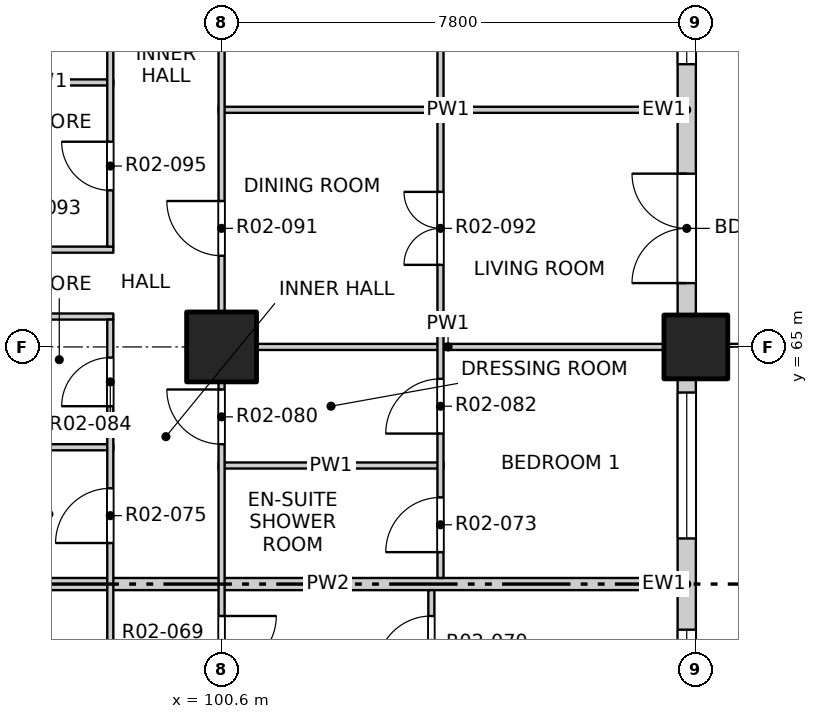
"""IFC4 building model, lengths in metres.
Left out: names, types, materials, properties, quantities, classifications, styles, units other than length and angle.
Written with IfcOpenShell. Run it as: python <this file> out.ifc"""

import sys

from ifc_helpers import new_model, si_unit, direction, frame, frame_2d, origin, origin_2d, place, context, subcontext, project, spatial, rectangle, extrude, element, fill, save


model = new_model("IFC4")
c1 = context("Model", 3, precision=1e-05, world=origin(), true_north=direction((0.0, 1.0)))
c2 = subcontext(c1, "Body", "Model", "MODEL_VIEW")
j1 = project(units=[si_unit("LENGTHUNIT", "METRE"), si_unit("PLANEANGLEUNIT", "RADIAN")], contexts=[c1])
p1 = place(None, origin())
s1 = spatial("IfcSite", under=j1, at=p1, CompositionType="ELEMENT")
p2 = place(p1, origin())
s2 = spatial("IfcBuilding", under=s1, at=p2, CompositionType="ELEMENT")
p3 = place(p2, frame((0.0, 0.0, 36.5)))
s3 = spatial("IfcBuildingStorey", under=s2, at=p3, CompositionType="ELEMENT", Elevation=36.5)
p4 = place(p3, frame((108.4, 65.0, -0.25), z_axis=(0.0, 0.0, 1.0), x_axis=(1.0, 0.0, 0.0)))
e1 = element("IfcColumn", 1, at=p4, inside=s3, PredefinedType="COLUMN", context=c2, shape_type="SweptSolid", body=[
    extrude(rectangle(XDim=1.05, YDim=1.05, at=origin_2d()), origin(), (0.0, 0.0, 1.0), 3.4),
])
p5 = place(p3, frame((100.6, 65.0, -0.25), z_axis=(0.0, 0.0, 1.0), x_axis=(1.0, 0.0, 0.0)))
e2 = element("IfcColumn", 2, at=p5, inside=s3, PredefinedType="COLUMN", context=c2, shape_type="SweptSolid", body=[
    extrude(rectangle(XDim=1.15, YDim=1.15, at=origin_2d()), origin(), (0.0, 0.0, 1.0), 3.4),
])
p6 = place(p3, frame((108.25, 57.725, 0.0), z_axis=(0.0, 0.0, 1.0), x_axis=(0.0, 1.0, 0.0)))
e3 = element("IfcWall", 3, at=p6, inside=s3, PredefinedType="SOLIDWALL", context=c2, shape_type="SweptSolid", body=[
    extrude(rectangle(XDim=6.75, YDim=0.3, at=frame_2d((3.375, 0.0))), origin(), (0.0, 0.0, 1.0), 2.7),
])
p7 = place(p6, frame((0.225, 0.0, 0.9)))
e4 = element("IfcOpeningElement", 4, at=p7, cuts=e3, PredefinedType="OPENING", context=c2, shape_type="SweptSolid", body=[
    extrude(rectangle(XDim=2.4, YDim=1.8, at=frame_2d((1.2, 0.9))), frame((0.0, 0.16, 0.0), z_axis=(0.0, -1.0, 0.0), x_axis=(1.0, 0.0, 0.0)), (0.0, 0.0, 1.0), 0.32),
])
p8 = place(p6, frame((4.125, 0.0, 0.9)))
e5 = element("IfcOpeningElement", 5, at=p8, cuts=e3, PredefinedType="OPENING", context=c2, shape_type="SweptSolid", body=[
    extrude(rectangle(XDim=2.4, YDim=1.8, at=frame_2d((1.2, 0.9))), frame((0.0, 0.16, 0.0), z_axis=(0.0, -1.0, 0.0), x_axis=(1.0, 0.0, 0.0)), (0.0, 0.0, 1.0), 0.32),
])
p9 = place(p3, frame((108.25, 65.525, 0.0), z_axis=(0.0, 0.0, 1.0), x_axis=(0.0, 1.0, 0.0)))
e6 = element("IfcWall", 6, at=p9, inside=s3, PredefinedType="SOLIDWALL", context=c2, shape_type="SweptSolid", body=[
    extrude(rectangle(XDim=6.75, YDim=0.3, at=frame_2d((3.375, 0.0))), origin(), (0.0, 0.0, 1.0), 2.7),
])
p10 = place(p9, frame((0.525, 0.0, 0.0)))
e7 = element("IfcOpeningElement", 7, at=p10, cuts=e6, PredefinedType="OPENING", context=c2, shape_type="SweptSolid", body=[
    extrude(rectangle(XDim=1.8, YDim=2.4, at=frame_2d((0.9, 1.2))), frame((0.0, 0.16, 0.0), z_axis=(0.0, -1.0, 0.0), x_axis=(1.0, 0.0, 0.0)), (0.0, 0.0, 1.0), 0.32),
])
p11 = place(p9, frame((4.125, 0.0, 0.9)))
e8 = element("IfcOpeningElement", 8, at=p11, cuts=e6, PredefinedType="OPENING", context=c2, shape_type="SweptSolid", body=[
    extrude(rectangle(XDim=2.4, YDim=1.8, at=frame_2d((1.2, 0.9))), frame((0.0, 0.16, 0.0), z_axis=(0.0, -1.0, 0.0), x_axis=(1.0, 0.0, 0.0)), (0.0, 0.0, 1.0), 0.32),
])
p12 = place(p3, frame((96.6, 61.1, 0.0), z_axis=(0.0, 0.0, 1.0), x_axis=(1.0, 0.0, 0.0)))
e9 = element("IfcWall", 9, at=p12, inside=s3, PredefinedType="PARTITIONING", context=c2, shape_type="SweptSolid", body=[
    extrude(rectangle(XDim=11.5, YDim=0.2, at=frame_2d((5.75, 0.0))), origin(), (0.0, 0.0, 1.0), 3.15),
])
p13 = place(p3, frame((100.55, 63.05, 0.0), z_axis=(0.0, 0.0, 1.0), x_axis=(1.0, 0.0, 0.0)))
e10 = element("IfcWall", 10, at=p13, inside=s3, PredefinedType="PARTITIONING", context=c2, shape_type="SweptSolid", body=[
    extrude(rectangle(XDim=3.7, YDim=0.1, at=frame_2d((1.85, 0.0))), origin(), (0.0, 0.0, 1.0), 3.15),
])
p14 = place(p3, frame((96.6, 63.35, 0.0), z_axis=(0.0, 0.0, 1.0), x_axis=(1.0, 0.0, 0.0)))
e11 = element("IfcWall", 11, at=p14, inside=s3, PredefinedType="PARTITIONING", context=c2, shape_type="SweptSolid", body=[
    extrude(rectangle(XDim=2.22, YDim=0.1, at=frame_2d((1.11, 0.0))), origin(), (0.0, 0.0, 1.0), 3.15),
])
p15 = place(p3, frame((100.55, 65.0, 0.0), z_axis=(0.0, 0.0, 1.0), x_axis=(1.0, 0.0, 0.0)))
e12 = element("IfcWall", 12, at=p15, inside=s3, PredefinedType="PARTITIONING", context=c2, shape_type="SweptSolid", body=[
    extrude(rectangle(XDim=7.55, YDim=0.1, at=frame_2d((3.775, 0.0))), origin(), (0.0, 0.0, 1.0), 2.55),
])
for number, where, z_axis, x_axis in (
    (13, (96.6, 65.5, 0.0), (0.0, 0.0, 1.0), (1.0, 0.0, 0.0)),
    (14, (96.6, 66.6, 0.0), (0.0, 0.0, 1.0), (1.0, 0.0, 0.0)),
):
    element("IfcWall", number, at=place(p3, frame(where, z_axis=z_axis, x_axis=x_axis)), inside=s3, PredefinedType="PARTITIONING", context=c2, shape_type="SweptSolid", body=[
        extrude(rectangle(XDim=2.22, YDim=0.1, at=frame_2d((1.11, 0.0))), origin(), (0.0, 0.0, 1.0), 3.15),
    ])
p16 = place(p3, frame((100.55, 68.9, 0.0), z_axis=(0.0, 0.0, 1.0), x_axis=(1.0, 0.0, 0.0)))
e15 = element("IfcWall", 15, at=p16, inside=s3, PredefinedType="PARTITIONING", context=c2, shape_type="SweptSolid", body=[
    extrude(rectangle(XDim=7.55, YDim=0.1, at=frame_2d((3.775, 0.0))), origin(), (0.0, 0.0, 1.0), 3.15),
])
p17 = place(p3, frame((96.6, 69.35, 0.0), z_axis=(0.0, 0.0, 1.0), x_axis=(1.0, 0.0, 0.0)))
e16 = element("IfcWall", 16, at=p17, inside=s3, PredefinedType="PARTITIONING", context=c2, shape_type="SweptSolid", body=[
    extrude(rectangle(XDim=2.22, YDim=0.1, at=frame_2d((1.11, 0.0))), origin(), (0.0, 0.0, 1.0), 3.15),
])
p18 = place(p3, frame((98.77, 55.7, 0.0), z_axis=(0.0, 0.0, 1.0), x_axis=(0.0, 1.0, 0.0)))
e17 = element("IfcWall", 17, at=p18, inside=s3, PredefinedType="PARTITIONING", context=c2, shape_type="SweptSolid", body=[
    extrude(rectangle(XDim=9.75, YDim=0.1, at=frame_2d((4.875, 0.0))), origin(), (0.0, 0.0, 1.0), 3.15),
])
p19 = place(p18, frame((0.7, 0.0, 0.0)))
e18 = element("IfcOpeningElement", 18, at=p19, cuts=e17, PredefinedType="OPENING", context=c2, shape_type="SweptSolid", body=[
    extrude(rectangle(XDim=0.8, YDim=2.1, at=frame_2d((0.4, 1.05))), frame((0.0, 0.06, 0.0), z_axis=(0.0, -1.0, 0.0), x_axis=(1.0, 0.0, 0.0)), (0.0, 0.0, 1.0), 0.12),
])
p20 = place(p18, frame((3.375, 0.0, 0.0)))
e19 = element("IfcOpeningElement", 19, at=p20, cuts=e17, PredefinedType="OPENING", context=c2, shape_type="SweptSolid", body=[
    extrude(rectangle(XDim=0.9, YDim=2.1, at=frame_2d((0.45, 1.05))), frame((0.0, 0.06, 0.0), z_axis=(0.0, -1.0, 0.0), x_axis=(1.0, 0.0, 0.0)), (0.0, 0.0, 1.0), 0.12),
])
p21 = place(p18, frame((6.075, 0.0, 0.0)))
e20 = element("IfcOpeningElement", 20, at=p21, cuts=e17, PredefinedType="OPENING", context=c2, shape_type="SweptSolid", body=[
    extrude(rectangle(XDim=0.9, YDim=2.1, at=frame_2d((0.45, 1.05))), frame((0.0, 0.06, 0.0), z_axis=(0.0, -1.0, 0.0), x_axis=(1.0, 0.0, 0.0)), (0.0, 0.0, 1.0), 0.12),
])
p22 = place(p18, frame((8.325, 0.0, 0.0)))
e21 = element("IfcOpeningElement", 21, at=p22, cuts=e17, PredefinedType="OPENING", context=c2, shape_type="SweptSolid", body=[
    extrude(rectangle(XDim=0.8, YDim=2.1, at=frame_2d((0.4, 1.05))), frame((0.0, 0.06, 0.0), z_axis=(0.0, -1.0, 0.0), x_axis=(1.0, 0.0, 0.0)), (0.0, 0.0, 1.0), 0.12),
])
p23 = place(p3, frame((98.77, 66.65, 0.0), z_axis=(0.0, 0.0, 1.0), x_axis=(0.0, 1.0, 0.0)))
e22 = element("IfcWall", 22, at=p23, inside=s3, PredefinedType="PARTITIONING", context=c2, shape_type="SweptSolid", body=[
    extrude(rectangle(XDim=14.95, YDim=0.1, at=frame_2d((7.475, 0.0))), origin(), (0.0, 0.0, 1.0), 3.15),
])
p24 = place(p23, frame((0.925, 0.0, 0.0)))
e23 = element("IfcOpeningElement", 23, at=p24, cuts=e22, PredefinedType="OPENING", context=c2, shape_type="SweptSolid", body=[
    extrude(rectangle(XDim=0.8, YDim=2.1, at=frame_2d((0.4, 1.05))), frame((0.0, 0.06, 0.0), z_axis=(0.0, -1.0, 0.0), x_axis=(1.0, 0.0, 0.0)), (0.0, 0.0, 1.0), 0.12),
])
p25 = place(p23, frame((3.975, 0.0, 0.0)))
e24 = element("IfcOpeningElement", 24, at=p25, cuts=e22, PredefinedType="OPENING", context=c2, shape_type="SweptSolid", body=[
    extrude(rectangle(XDim=0.9, YDim=2.1, at=frame_2d((0.45, 1.05))), frame((0.0, 0.06, 0.0), z_axis=(0.0, -1.0, 0.0), x_axis=(1.0, 0.0, 0.0)), (0.0, 0.0, 1.0), 0.12),
])
p26 = place(p23, frame((6.915, 0.0, 0.0)))
e25 = element("IfcOpeningElement", 25, at=p26, cuts=e22, PredefinedType="OPENING", context=c2, shape_type="SweptSolid", body=[
    extrude(rectangle(XDim=0.9, YDim=2.1, at=frame_2d((0.45, 1.05))), frame((0.0, 0.06, 0.0), z_axis=(0.0, -1.0, 0.0), x_axis=(1.0, 0.0, 0.0)), (0.0, 0.0, 1.0), 0.12),
])
p27 = place(p23, frame((9.63, 0.0, 0.0)))
e26 = element("IfcOpeningElement", 26, at=p27, cuts=e22, PredefinedType="OPENING", context=c2, shape_type="SweptSolid", body=[
    extrude(rectangle(XDim=0.8, YDim=2.1, at=frame_2d((0.4, 1.05))), frame((0.0, 0.06, 0.0), z_axis=(0.0, -1.0, 0.0), x_axis=(1.0, 0.0, 0.0)), (0.0, 0.0, 1.0), 0.12),
])
p28 = place(p23, frame((12.79, 0.0, 0.0)))
e27 = element("IfcOpeningElement", 27, at=p28, cuts=e22, PredefinedType="OPENING", context=c2, shape_type="SweptSolid", body=[
    extrude(rectangle(XDim=0.9, YDim=2.1, at=frame_2d((0.45, 1.05))), frame((0.0, 0.06, 0.0), z_axis=(0.0, -1.0, 0.0), x_axis=(1.0, 0.0, 0.0)), (0.0, 0.0, 1.0), 0.12),
])
p29 = place(p3, frame((100.6, 49.4, 0.0), z_axis=(0.0, 0.0, 1.0), x_axis=(0.0, 1.0, 0.0)))
e28 = element("IfcWall", 28, at=p29, inside=s3, PredefinedType="PARTITIONING", context=c2, shape_type="SweptSolid", body=[
    extrude(rectangle(XDim=31.2, YDim=0.1, at=frame_2d((15.6, 0.0))), origin(), (0.0, 0.0, 1.0), 3.15),
])
p30 = place(p29, frame((2.475, 0.0, 0.0)))
e29 = element("IfcOpeningElement", 29, at=p30, cuts=e28, PredefinedType="OPENING", context=c2, shape_type="SweptSolid", body=[
    extrude(rectangle(XDim=0.9, YDim=2.1, at=frame_2d((0.45, 1.05))), frame((0.0, 0.06, 0.0), z_axis=(0.0, -1.0, 0.0), x_axis=(1.0, 0.0, 0.0)), (0.0, 0.0, 1.0), 0.12),
])
p31 = place(p29, frame((5.4, 0.0, 0.0)))
e30 = element("IfcOpeningElement", 30, at=p31, cuts=e28, PredefinedType="OPENING", context=c2, shape_type="SweptSolid", body=[
    extrude(rectangle(XDim=0.9, YDim=2.1, at=frame_2d((0.45, 1.05))), frame((0.0, 0.06, 0.0), z_axis=(0.0, -1.0, 0.0), x_axis=(1.0, 0.0, 0.0)), (0.0, 0.0, 1.0), 0.12),
])
p32 = place(p29, frame((10.275, 0.0, 0.0)))
e31 = element("IfcOpeningElement", 31, at=p32, cuts=e28, PredefinedType="OPENING", context=c2, shape_type="SweptSolid", body=[
    extrude(rectangle(XDim=0.9, YDim=2.1, at=frame_2d((0.45, 1.05))), frame((0.0, 0.06, 0.0), z_axis=(0.0, -1.0, 0.0), x_axis=(1.0, 0.0, 0.0)), (0.0, 0.0, 1.0), 0.12),
])
p33 = place(p29, frame((14.0, 0.0, 0.0)))
e32 = element("IfcOpeningElement", 32, at=p33, cuts=e28, PredefinedType="OPENING", context=c2, shape_type="SweptSolid", body=[
    extrude(rectangle(XDim=0.9, YDim=2.1, at=frame_2d((0.45, 1.05))), frame((0.0, 0.06, 0.0), z_axis=(0.0, -1.0, 0.0), x_axis=(1.0, 0.0, 0.0)), (0.0, 0.0, 1.0), 0.12),
])
p34 = place(p29, frame((17.1, 0.0, 0.0)))
e33 = element("IfcOpeningElement", 33, at=p34, cuts=e28, PredefinedType="OPENING", context=c2, shape_type="SweptSolid", body=[
    extrude(rectangle(XDim=0.9, YDim=2.1, at=frame_2d((0.45, 1.05))), frame((0.0, 0.06, 0.0), z_axis=(0.0, -1.0, 0.0), x_axis=(1.0, 0.0, 0.0)), (0.0, 0.0, 1.0), 0.12),
])
p35 = place(p29, frame((21.0, 0.0, 0.0)))
e34 = element("IfcOpeningElement", 34, at=p35, cuts=e28, PredefinedType="OPENING", context=c2, shape_type="SweptSolid", body=[
    extrude(rectangle(XDim=0.9, YDim=2.1, at=frame_2d((0.45, 1.05))), frame((0.0, 0.06, 0.0), z_axis=(0.0, -1.0, 0.0), x_axis=(1.0, 0.0, 0.0)), (0.0, 0.0, 1.0), 0.12),
])
p36 = place(p29, frame((25.875, 0.0, 0.0)))
e35 = element("IfcOpeningElement", 35, at=p36, cuts=e28, PredefinedType="OPENING", context=c2, shape_type="SweptSolid", body=[
    extrude(rectangle(XDim=0.9, YDim=2.1, at=frame_2d((0.45, 1.05))), frame((0.0, 0.06, 0.0), z_axis=(0.0, -1.0, 0.0), x_axis=(1.0, 0.0, 0.0)), (0.0, 0.0, 1.0), 0.12),
])
p37 = place(p29, frame((29.6, 0.0, 0.0)))
e36 = element("IfcOpeningElement", 36, at=p37, cuts=e28, PredefinedType="OPENING", context=c2, shape_type="SweptSolid", body=[
    extrude(rectangle(XDim=0.9, YDim=2.1, at=frame_2d((0.45, 1.05))), frame((0.0, 0.06, 0.0), z_axis=(0.0, -1.0, 0.0), x_axis=(1.0, 0.0, 0.0)), (0.0, 0.0, 1.0), 0.12),
])
p38 = place(p3, frame((104.05, 41.9, 0.0), z_axis=(0.0, 0.0, 1.0), x_axis=(0.0, 1.0, 0.0)))
e37 = element("IfcWall", 37, at=p38, inside=s3, PredefinedType="PARTITIONING", context=c2, shape_type="SweptSolid", body=[
    extrude(rectangle(XDim=19.1, YDim=0.1, at=frame_2d((9.55, 0.0))), origin(), (0.0, 0.0, 1.0), 3.15),
])
p39 = place(p38, frame((1.05, 0.0, 0.0)))
e38 = element("IfcOpeningElement", 38, at=p39, cuts=e37, PredefinedType="OPENING", context=c2, shape_type="SweptSolid", body=[
    extrude(rectangle(XDim=1.2, YDim=2.1, at=frame_2d((0.6, 1.05))), frame((0.0, 0.06, 0.0), z_axis=(0.0, -1.0, 0.0), x_axis=(1.0, 0.0, 0.0)), (0.0, 0.0, 1.0), 0.12),
])
p40 = place(p38, frame((4.95, 0.0, 0.0)))
e39 = element("IfcOpeningElement", 39, at=p40, cuts=e37, PredefinedType="OPENING", context=c2, shape_type="SweptSolid", body=[
    extrude(rectangle(XDim=1.2, YDim=2.1, at=frame_2d((0.6, 1.05))), frame((0.0, 0.06, 0.0), z_axis=(0.0, -1.0, 0.0), x_axis=(1.0, 0.0, 0.0)), (0.0, 0.0, 1.0), 0.12),
])
p41 = place(p38, frame((8.025, 0.0, 0.0)))
e40 = element("IfcOpeningElement", 40, at=p41, cuts=e37, PredefinedType="OPENING", context=c2, shape_type="SweptSolid", body=[
    extrude(rectangle(XDim=0.9, YDim=2.1, at=frame_2d((0.45, 1.05))), frame((0.0, 0.06, 0.0), z_axis=(0.0, -1.0, 0.0), x_axis=(1.0, 0.0, 0.0)), (0.0, 0.0, 1.0), 0.12),
])
p42 = place(p38, frame((9.975, 0.0, 0.0)))
e41 = element("IfcOpeningElement", 41, at=p42, cuts=e37, PredefinedType="OPENING", context=c2, shape_type="SweptSolid", body=[
    extrude(rectangle(XDim=0.9, YDim=2.1, at=frame_2d((0.45, 1.05))), frame((0.0, 0.06, 0.0), z_axis=(0.0, -1.0, 0.0), x_axis=(1.0, 0.0, 0.0)), (0.0, 0.0, 1.0), 0.12),
])
p43 = place(p38, frame((12.75, 0.0, 0.0)))
e42 = element("IfcOpeningElement", 42, at=p43, cuts=e37, PredefinedType="OPENING", context=c2, shape_type="SweptSolid", body=[
    extrude(rectangle(XDim=1.2, YDim=2.1, at=frame_2d((0.6, 1.05))), frame((0.0, 0.06, 0.0), z_axis=(0.0, -1.0, 0.0), x_axis=(1.0, 0.0, 0.0)), (0.0, 0.0, 1.0), 0.12),
])
p44 = place(p38, frame((15.825, 0.0, 0.0)))
e43 = element("IfcOpeningElement", 43, at=p44, cuts=e37, PredefinedType="OPENING", context=c2, shape_type="SweptSolid", body=[
    extrude(rectangle(XDim=0.9, YDim=2.1, at=frame_2d((0.45, 1.05))), frame((0.0, 0.06, 0.0), z_axis=(0.0, -1.0, 0.0), x_axis=(1.0, 0.0, 0.0)), (0.0, 0.0, 1.0), 0.12),
])
p45 = place(p38, frame((17.775, 0.0, 0.0)))
e44 = element("IfcOpeningElement", 44, at=p45, cuts=e37, PredefinedType="OPENING", context=c2, shape_type="SweptSolid", body=[
    extrude(rectangle(XDim=0.9, YDim=2.1, at=frame_2d((0.45, 1.05))), frame((0.0, 0.06, 0.0), z_axis=(0.0, -1.0, 0.0), x_axis=(1.0, 0.0, 0.0)), (0.0, 0.0, 1.0), 0.12),
])
p46 = place(p3, frame((104.2, 61.2, 0.0), z_axis=(0.0, 0.0, 1.0), x_axis=(0.0, 1.0, 0.0)))
e45 = element("IfcWall", 45, at=p46, inside=s3, PredefinedType="PARTITIONING", context=c2, shape_type="SweptSolid", body=[
    extrude(rectangle(XDim=11.5, YDim=0.1, at=frame_2d((5.75, 0.0))), origin(), (0.0, 0.0, 1.0), 3.15),
])
p47 = place(p46, frame((0.425, 0.0, 0.0)))
e46 = element("IfcOpeningElement", 46, at=p47, cuts=e45, PredefinedType="OPENING", context=c2, shape_type="SweptSolid", body=[
    extrude(rectangle(XDim=0.9, YDim=2.1, at=frame_2d((0.45, 1.05))), frame((0.0, 0.06, 0.0), z_axis=(0.0, -1.0, 0.0), x_axis=(1.0, 0.0, 0.0)), (0.0, 0.0, 1.0), 0.12),
])
p48 = place(p46, frame((2.375, 0.0, 0.0)))
e47 = element("IfcOpeningElement", 47, at=p48, cuts=e45, PredefinedType="OPENING", context=c2, shape_type="SweptSolid", body=[
    extrude(rectangle(XDim=0.9, YDim=2.1, at=frame_2d((0.45, 1.05))), frame((0.0, 0.06, 0.0), z_axis=(0.0, -1.0, 0.0), x_axis=(1.0, 0.0, 0.0)), (0.0, 0.0, 1.0), 0.12),
])
p49 = place(p46, frame((5.15, 0.0, 0.0)))
e48 = element("IfcOpeningElement", 48, at=p49, cuts=e45, PredefinedType="OPENING", context=c2, shape_type="SweptSolid", body=[
    extrude(rectangle(XDim=1.2, YDim=2.1, at=frame_2d((0.6, 1.05))), frame((0.0, 0.06, 0.0), z_axis=(0.0, -1.0, 0.0), x_axis=(1.0, 0.0, 0.0)), (0.0, 0.0, 1.0), 0.12),
])
p50 = place(p46, frame((9.05, 0.0, 0.0)))
e49 = element("IfcOpeningElement", 49, at=p50, cuts=e45, PredefinedType="OPENING", context=c2, shape_type="SweptSolid", body=[
    extrude(rectangle(XDim=1.2, YDim=2.1, at=frame_2d((0.6, 1.05))), frame((0.0, 0.06, 0.0), z_axis=(0.0, -1.0, 0.0), x_axis=(1.0, 0.0, 0.0)), (0.0, 0.0, 1.0), 0.12),
])
p51 = place(p7, origin())
e50 = element("IfcWindow", 50, at=p51, inside=s3, PartitioningType="DOUBLE_PANEL_VERTICAL", PredefinedType="WINDOW", context=c2, shape_type="SweptSolid", body=[
    extrude(rectangle(XDim=2.4, YDim=1.8, at=frame_2d((1.2, 0.9))), frame((0.0, 0.03, 0.0), z_axis=(0.0, -1.0, 0.0), x_axis=(1.0, 0.0, 0.0)), (0.0, 0.0, 1.0), 0.06),
])
fill(e4, e50)
p52 = place(p8, origin())
e51 = element("IfcWindow", 51, at=p52, inside=s3, PartitioningType="DOUBLE_PANEL_VERTICAL", PredefinedType="WINDOW", context=c2, shape_type="SweptSolid", body=[
    extrude(rectangle(XDim=2.4, YDim=1.8, at=frame_2d((1.2, 0.9))), frame((0.0, 0.03, 0.0), z_axis=(0.0, -1.0, 0.0), x_axis=(1.0, 0.0, 0.0)), (0.0, 0.0, 1.0), 0.06),
])
fill(e5, e51)
p53 = place(p10, origin())
e52 = element("IfcDoor", 52, at=p53, inside=s3, OperationType="DOUBLE_DOOR_SINGLE_SWING", PredefinedType="DOOR", context=c2, shape_type="SweptSolid", body=[
    extrude(rectangle(XDim=1.8, YDim=2.4, at=frame_2d((0.9, 1.2))), frame((0.0, 0.025, 0.0), z_axis=(0.0, -1.0, 0.0), x_axis=(1.0, 0.0, 0.0)), (0.0, 0.0, 1.0), 0.05),
])
fill(e7, e52)
p54 = place(p11, origin())
e53 = element("IfcWindow", 53, at=p54, inside=s3, PartitioningType="DOUBLE_PANEL_VERTICAL", PredefinedType="WINDOW", context=c2, shape_type="SweptSolid", body=[
    extrude(rectangle(XDim=2.4, YDim=1.8, at=frame_2d((1.2, 0.9))), frame((0.0, 0.03, 0.0), z_axis=(0.0, -1.0, 0.0), x_axis=(1.0, 0.0, 0.0)), (0.0, 0.0, 1.0), 0.06),
])
fill(e8, e53)
p55 = place(p32, origin())
e54 = element("IfcDoor", 54, at=p55, inside=s3, OperationType="SINGLE_SWING_LEFT", PredefinedType="DOOR", context=c2, shape_type="SweptSolid", body=[
    extrude(rectangle(XDim=0.9, YDim=2.1, at=frame_2d((0.45, 1.05))), frame((0.0, 0.025, 0.0), z_axis=(0.0, -1.0, 0.0), x_axis=(1.0, 0.0, 0.0)), (0.0, 0.0, 1.0), 0.05),
])
fill(e31, e54)
p56 = place(p45, origin())
e55 = element("IfcDoor", 55, at=p56, inside=s3, OperationType="SINGLE_SWING_LEFT", PredefinedType="DOOR", context=c2, shape_type="SweptSolid", body=[
    extrude(rectangle(XDim=0.9, YDim=2.1, at=frame_2d((0.45, 1.05))), frame((0.0, 0.025, 0.0), z_axis=(0.0, -1.0, 0.0), x_axis=(1.0, 0.0, 0.0)), (0.0, 0.0, 1.0), 0.05),
])
fill(e44, e55)
p57 = place(p47, origin())
e56 = element("IfcDoor", 56, at=p57, inside=s3, OperationType="SINGLE_SWING_LEFT", PredefinedType="DOOR", context=c2, shape_type="SweptSolid", body=[
    extrude(rectangle(XDim=0.9, YDim=2.1, at=frame_2d((0.45, 1.05))), frame((0.0, 0.025, 0.0), z_axis=(0.0, -1.0, 0.0), x_axis=(1.0, 0.0, 0.0)), (0.0, 0.0, 1.0), 0.05),
])
fill(e46, e56)
p58 = place(p21, origin())
e57 = element("IfcDoor", 57, at=p58, inside=s3, OperationType="SINGLE_SWING_LEFT", PredefinedType="DOOR", context=c2, shape_type="SweptSolid", body=[
    extrude(rectangle(XDim=0.9, YDim=2.1, at=frame_2d((0.45, 1.05))), frame((0.0, 0.025, 0.0), z_axis=(0.0, -1.0, 0.0), x_axis=(1.0, 0.0, 0.0)), (0.0, 0.0, 1.0), 0.05),
])
fill(e20, e57)
p59 = place(p33, origin())
e58 = element("IfcDoor", 58, at=p59, inside=s3, OperationType="SINGLE_SWING_RIGHT", PredefinedType="DOOR", context=c2, shape_type="SweptSolid", body=[
    extrude(rectangle(XDim=0.9, YDim=2.1, at=frame_2d((0.45, 1.05))), frame((0.0, 0.025, 0.0), z_axis=(0.0, -1.0, 0.0), x_axis=(1.0, 0.0, 0.0)), (0.0, 0.0, 1.0), 0.05),
])
fill(e32, e58)
p60 = place(p48, origin())
e59 = element("IfcDoor", 59, at=p60, inside=s3, OperationType="SINGLE_SWING_LEFT", PredefinedType="DOOR", context=c2, shape_type="SweptSolid", body=[
    extrude(rectangle(XDim=0.9, YDim=2.1, at=frame_2d((0.45, 1.05))), frame((0.0, 0.025, 0.0), z_axis=(0.0, -1.0, 0.0), x_axis=(1.0, 0.0, 0.0)), (0.0, 0.0, 1.0), 0.05),
])
fill(e47, e59)
p61 = place(p22, origin())
e60 = element("IfcDoor", 60, at=p61, inside=s3, OperationType="SINGLE_SWING_LEFT", PredefinedType="DOOR", context=c2, shape_type="SweptSolid", body=[
    extrude(rectangle(XDim=0.8, YDim=2.1, at=frame_2d((0.4, 1.05))), frame((0.0, 0.025, 0.0), z_axis=(0.0, -1.0, 0.0), x_axis=(1.0, 0.0, 0.0)), (0.0, 0.0, 1.0), 0.05),
])
fill(e21, e60)
p62 = place(p34, origin())
e61 = element("IfcDoor", 61, at=p62, inside=s3, OperationType="SINGLE_SWING_RIGHT", PredefinedType="DOOR", context=c2, shape_type="SweptSolid", body=[
    extrude(rectangle(XDim=0.9, YDim=2.1, at=frame_2d((0.45, 1.05))), frame((0.0, 0.025, 0.0), z_axis=(0.0, -1.0, 0.0), x_axis=(1.0, 0.0, 0.0)), (0.0, 0.0, 1.0), 0.05),
])
fill(e33, e61)
p63 = place(p49, origin())
e62 = element("IfcDoor", 62, at=p63, inside=s3, OperationType="DOUBLE_DOOR_SINGLE_SWING", PredefinedType="DOOR", context=c2, shape_type="SweptSolid", body=[
    extrude(rectangle(XDim=1.2, YDim=2.1, at=frame_2d((0.6, 1.05))), frame((0.0, 0.025, 0.0), z_axis=(0.0, -1.0, 0.0), x_axis=(1.0, 0.0, 0.0)), (0.0, 0.0, 1.0), 0.05),
])
fill(e48, e62)
p64 = place(p24, origin())
e63 = element("IfcDoor", 63, at=p64, inside=s3, OperationType="SINGLE_SWING_RIGHT", PredefinedType="DOOR", context=c2, shape_type="SweptSolid", body=[
    extrude(rectangle(XDim=0.8, YDim=2.1, at=frame_2d((0.4, 1.05))), frame((0.0, 0.025, 0.0), z_axis=(0.0, -1.0, 0.0), x_axis=(1.0, 0.0, 0.0)), (0.0, 0.0, 1.0), 0.05),
])
fill(e23, e63)
save(model, sys.argv[1])
